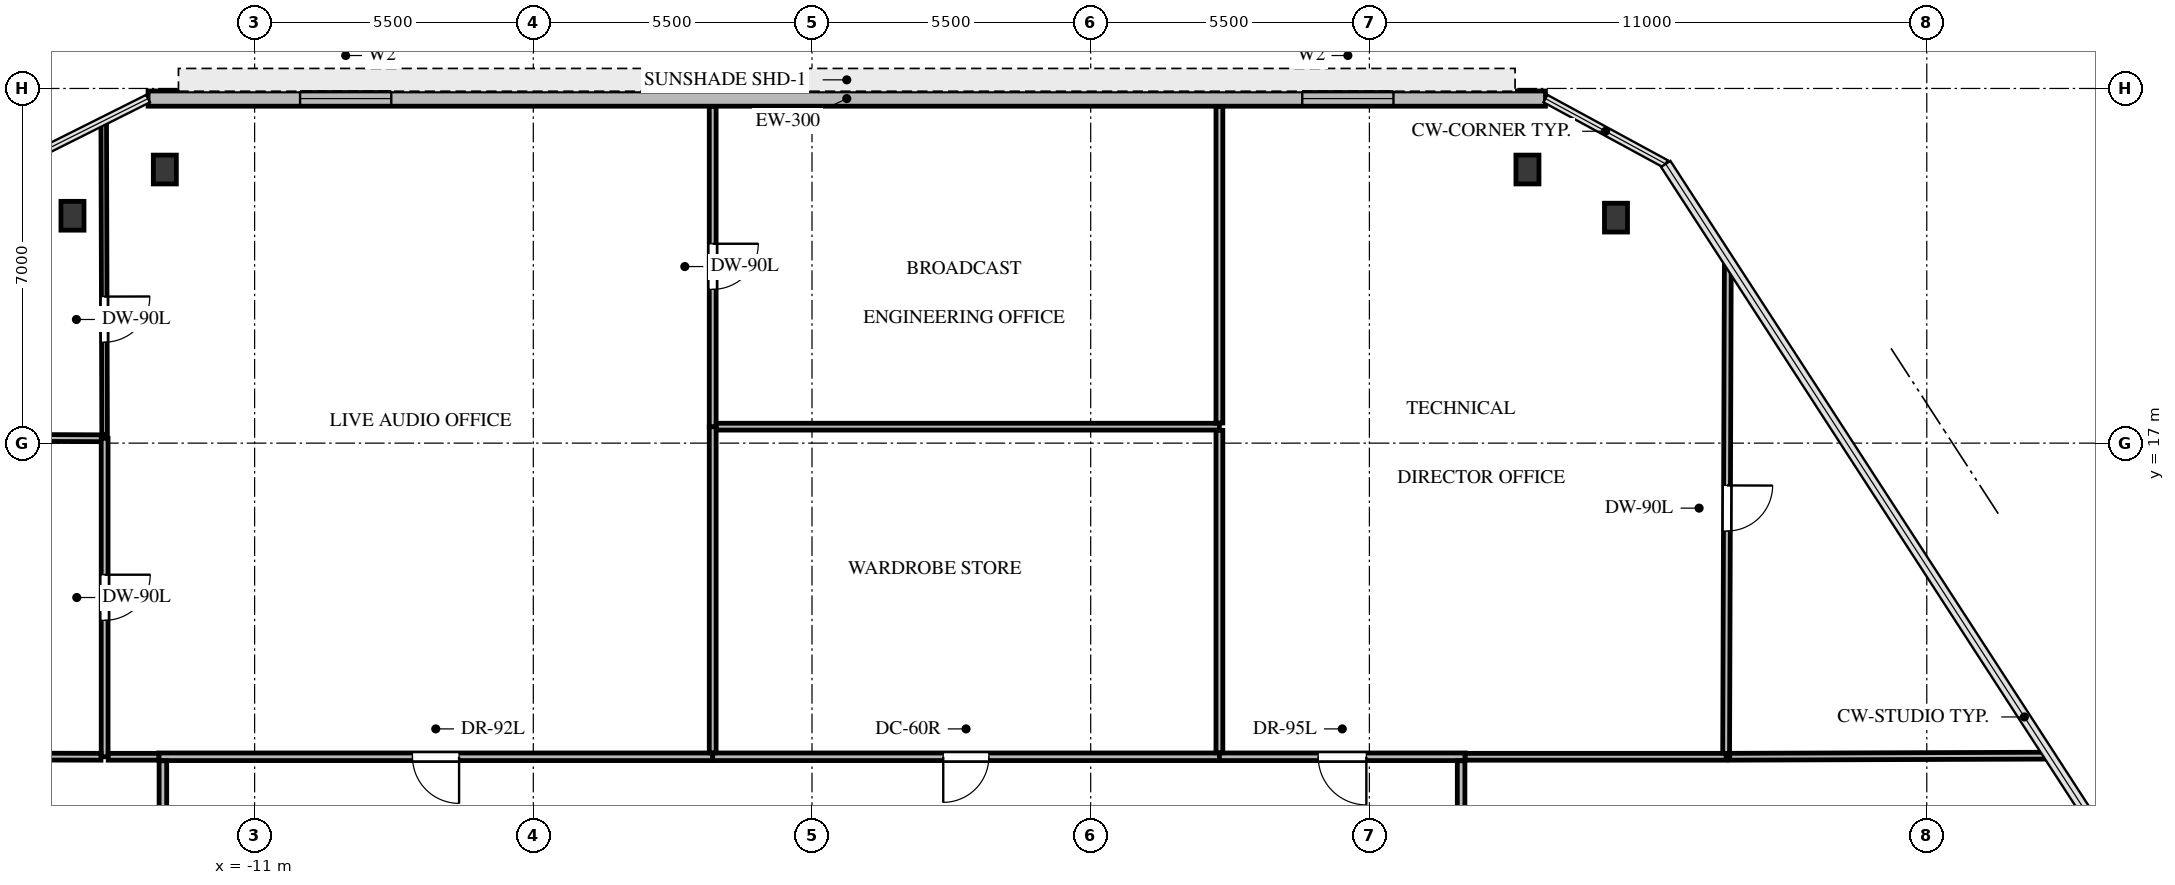
"""IFC4 building model, lengths in metres.
Left out: names, types, materials, properties, quantities, classifications, styles, units other than length and angle.
Written with IfcOpenShell. Run it as: python <this file> out.ifc"""

import sys

from ifc_helpers import new_model, si_unit, direction, frame, frame_2d, origin, origin_2d, place, context, subcontext, project, spatial, rectangle, i_section, extrude, source, transform, mapped, element, fill, save


model = new_model("IFC4")
c1 = context("Model", 3, precision=1e-05, world=origin(), true_north=direction((0.0, 1.0)))
c2 = subcontext(c1, "Body", "Model", "MODEL_VIEW")
j1 = project(units=[si_unit("LENGTHUNIT", "METRE"), si_unit("PLANEANGLEUNIT", "RADIAN")], contexts=[c1])
p1 = place(None, origin())
s1 = spatial("IfcSite", under=j1, at=p1, CompositionType="ELEMENT")
p2 = place(p1, origin())
s2 = spatial("IfcBuilding", under=s1, at=p2, CompositionType="ELEMENT")
p3 = place(p2, frame((0.0, 0.0, 21.2)))
s3 = spatial("IfcBuildingStorey", under=s2, at=p3, CompositionType="ELEMENT", Elevation=21.2)
m1 = source(origin(), c2, "Body", "SweptSolid", [
    extrude(i_section(OverallWidth=0.454, OverallDepth=0.569, WebThickness=0.078, FlangeThickness=0.125, FilletRadius=0.031, at=origin_2d()), origin(), (0.0, 0.0, 1.0), 5.6),
])
for number, where, z_axis, x_axis in (
    (1, (-14.594, 21.488, -0.32), (0.0, 0.0, 1.0), (1.0, 0.0, 0.0)),
    (2, (-12.772, 22.4, -0.32), (0.0, 0.0, 1.0), (1.0, 0.0, 0.0)),
    (3, (14.119, 22.4, -0.32), (0.0, 0.0, 1.0), (1.0, 0.0, 0.0)),
    (4, (15.866, 21.451, -0.32), (0.0, 0.0, 1.0), (1.0, 0.0, 0.0)),
):
    element("IfcColumn", number, at=place(p3, frame(where, z_axis=z_axis, x_axis=x_axis)), inside=s3, PredefinedType="COLUMN", context=c2, shape_type="MappedRepresentation", body=[
        mapped(m1, transform((0.0, 0.0, 0.0), x_axis=(1.0, 0.0, 0.0), y_axis=(0.0, 1.0, 0.0), z_axis=(0.0, 0.0, 1.0), scale=1.0)),
    ])
p4 = place(p3, frame((-13.103, 23.8, 0.0), z_axis=(0.0, 0.0, 1.0), x_axis=(1.0, 0.0, 0.0)))
e5 = element("IfcWall", 5, at=p4, inside=s3, PredefinedType="SOLIDWALL", context=c2, shape_type="SweptSolid", body=[
    extrude(rectangle(XDim=27.578, YDim=0.3, at=frame_2d((13.789, 0.0))), origin(), (0.0, 0.0, 1.0), 5.28),
])
p5 = place(p4, frame((3.0, 0.0, 1.0)))
e6 = element("IfcOpeningElement", 6, at=p5, cuts=e5, PredefinedType="OPENING", context=c2, shape_type="SweptSolid", body=[
    extrude(rectangle(XDim=1.8, YDim=2.1, at=frame_2d((0.9, 1.05))), frame((0.0, 0.16, 0.0), z_axis=(0.0, -1.0, 0.0), x_axis=(1.0, 0.0, 0.0)), (0.0, 0.0, 1.0), 0.32),
])
p6 = place(p4, frame((22.778, 0.0, 1.0)))
e7 = element("IfcOpeningElement", 7, at=p6, cuts=e5, PredefinedType="OPENING", context=c2, shape_type="SweptSolid", body=[
    extrude(rectangle(XDim=1.8, YDim=2.1, at=frame_2d((0.9, 1.05))), frame((0.0, 0.16, 0.0), z_axis=(0.0, -1.0, 0.0), x_axis=(1.0, 0.0, 0.0)), (0.0, 0.0, 1.0), 0.32),
])
p7 = place(p3, frame((-1.96, 10.81, 0.0), z_axis=(0.0, 0.0, 1.0), x_axis=(-1.0, 0.0, 0.0)))
e8 = element("IfcWall", 8, at=p7, inside=s3, PredefinedType="PARTITIONING", context=c2, shape_type="SweptSolid", body=[
    extrude(rectangle(XDim=10.93, YDim=0.15, at=frame_2d((5.465, 0.0))), origin(), (0.0, 0.0, 1.0), 4.285),
])
p8 = place(p7, frame((5.005, 0.0, 0.0)))
e9 = element("IfcOpeningElement", 9, at=p8, cuts=e8, PredefinedType="OPENING", context=c2, shape_type="SweptSolid", body=[
    extrude(rectangle(XDim=0.92, YDim=2.1, at=frame_2d((0.46, 1.05))), frame((0.0, 0.085, 0.0), z_axis=(0.0, -1.0, 0.0), x_axis=(1.0, 0.0, 0.0)), (0.0, 0.0, 1.0), 0.17),
])
p9 = place(p3, frame((8.04, 10.81, 0.0), z_axis=(0.0, 0.0, 1.0), x_axis=(-1.0, 0.0, 0.0)))
e10 = element("IfcWall", 10, at=p9, inside=s3, PredefinedType="PARTITIONING", context=c2, shape_type="SweptSolid", body=[
    extrude(rectangle(XDim=10.0, YDim=0.15, at=frame_2d((5.0, 0.0))), origin(), (0.0, 0.0, 1.0), 4.818),
])
p10 = place(p9, frame((4.55, 0.0, 0.0)))
e11 = element("IfcOpeningElement", 11, at=p10, cuts=e10, PredefinedType="OPENING", context=c2, shape_type="SweptSolid", body=[
    extrude(rectangle(XDim=0.9, YDim=2.05, at=frame_2d((0.45, 1.025))), frame((0.0, 0.085, 0.0), z_axis=(0.0, -1.0, 0.0), x_axis=(1.0, 0.0, 0.0)), (0.0, 0.0, 1.0), 0.17),
])
p11 = place(p3, frame((12.89, 10.81, 0.0), z_axis=(0.0, 0.0, 1.0), x_axis=(-1.0, 0.0, 0.0)))
e12 = element("IfcWall", 12, at=p11, inside=s3, PredefinedType="PARTITIONING", context=c2, shape_type="SweptSolid", body=[
    extrude(rectangle(XDim=4.85, YDim=0.15, at=frame_2d((2.425, 0.0))), origin(), (0.0, 0.0, 1.0), 4.285),
])
p12 = place(p11, frame((1.95, 0.0, 0.0)))
e13 = element("IfcOpeningElement", 13, at=p12, cuts=e12, PredefinedType="OPENING", context=c2, shape_type="SweptSolid", body=[
    extrude(rectangle(XDim=0.95, YDim=2.1, at=frame_2d((0.475, 1.05))), frame((0.0, 0.085, 0.0), z_axis=(0.0, -1.0, 0.0), x_axis=(1.0, 0.0, 0.0)), (0.0, 0.0, 1.0), 0.17),
])
p13 = place(p3, frame((-12.81, 10.731, 0.0), z_axis=(0.0, 0.0, 1.0), x_axis=(0.0, -1.0, 0.0)))
e14 = element("IfcWall", 14, at=p13, inside=s3, PredefinedType="PARTITIONING", context=c2, shape_type="SweptSolid", body=[
    extrude(rectangle(XDim=3.691, YDim=0.15, at=frame_2d((1.845, 0.0))), origin(), (0.0, 0.0, 1.0), 5.265),
])
p14 = place(p13, frame((1.371, 0.0, 0.0)))
e15 = element("IfcOpeningElement", 15, at=p14, cuts=e14, PredefinedType="OPENING", context=c2, shape_type="SweptSolid", body=[
    extrude(rectangle(XDim=0.95, YDim=2.1, at=frame_2d((0.475, 1.05))), frame((0.0, 0.085, 0.0), z_axis=(0.0, -1.0, 0.0), x_axis=(1.0, 0.0, 0.0)), (0.0, 0.0, 1.0), 0.17),
])
p15 = place(p3, frame((12.81, 4.54, 0.0), z_axis=(0.0, 0.0, 1.0), x_axis=(0.0, 1.0, 0.0)))
e16 = element("IfcWall", 16, at=p15, inside=s3, PredefinedType="PARTITIONING", context=c2, shape_type="SweptSolid", body=[
    extrude(rectangle(XDim=6.191, YDim=0.15, at=frame_2d((3.095, 0.0))), origin(), (0.0, 0.0, 1.0), 5.265),
])
p16 = place(p15, frame((0.35, 0.0, 0.0)))
e17 = element("IfcOpeningElement", 17, at=p16, cuts=e16, PredefinedType="OPENING", context=c2, shape_type="SweptSolid", body=[
    extrude(rectangle(XDim=0.95, YDim=2.1, at=frame_2d((0.475, 1.05))), frame((0.0, 0.085, 0.0), z_axis=(0.0, -1.0, 0.0), x_axis=(1.0, 0.0, 0.0)), (0.0, 0.0, 1.0), 0.17),
])
p17 = place(p3, frame((-19.612, 17.12, 0.0), z_axis=(0.0, 0.0, 1.0), x_axis=(0.999990855289, -0.004276603511, 0.0)))
e18 = element("IfcWall", 18, at=p17, inside=s3, PredefinedType="PARTITIONING", context=c2, shape_type="SweptSolid", body=[
    extrude(rectangle(XDim=5.652, YDim=0.135, at=frame_2d((2.826, 0.0))), origin(), (0.0, 0.0, 1.0), 4.574),
])
p18 = place(p3, frame((-13.96, 17.096, 0.0), z_axis=(0.0, 0.0, 1.0), x_axis=(0.0, -1.0, 0.0)))
e19 = element("IfcWall", 19, at=p18, inside=s3, PredefinedType="PARTITIONING", context=c2, shape_type="SweptSolid", body=[
    extrude(rectangle(XDim=6.286, YDim=0.135, at=frame_2d((3.143, 0.0))), origin(), (0.0, 0.0, 1.0), 5.265),
])
p19 = place(p18, frame((2.693, 0.0, 0.0)))
e20 = element("IfcOpeningElement", 20, at=p19, cuts=e19, PredefinedType="OPENING", context=c2, shape_type="SweptSolid", body=[
    extrude(rectangle(XDim=0.9, YDim=2.05, at=frame_2d((0.45, 1.025))), frame((0.0, 0.078, 0.0), z_axis=(0.0, -1.0, 0.0), x_axis=(1.0, 0.0, 0.0)), (0.0, 0.0, 1.0), 0.155),
])
p20 = place(p3, frame((-14.031, 10.81, 0.0), z_axis=(0.0, 0.0, 1.0), x_axis=(-0.999997348739, 0.002302719182, 0.0)))
e21 = element("IfcWall", 21, at=p20, inside=s3, PredefinedType="PARTITIONING", context=c2, shape_type="SweptSolid", body=[
    extrude(rectangle(XDim=10.284, YDim=0.135, at=frame_2d((5.142, 0.0))), origin(), (0.0, 0.0, 1.0), 4.574),
])
p21 = place(p3, frame((-13.978, 23.362, 0.0), z_axis=(0.0, 0.0, 1.0), x_axis=(0.002798349441, -0.999996084613, 0.0)))
e22 = element("IfcWall", 22, at=p21, inside=s3, PredefinedType="MOVABLE", context=c2, shape_type="SweptSolid", body=[
    extrude(rectangle(XDim=6.194, YDim=0.11, at=frame_2d((3.097, 0.0))), origin(), (0.0, 0.0, 1.0), 4.285),
])
p22 = place(p21, frame((3.47, 0.0, 0.0)))
e23 = element("IfcOpeningElement", 23, at=p22, cuts=e22, PredefinedType="OPENING", context=c2, shape_type="SweptSolid", body=[
    extrude(rectangle(XDim=0.9, YDim=2.05, at=frame_2d((0.45, 1.025))), frame((0.0, 0.065, 0.0), z_axis=(0.0, -1.0, 0.0), x_axis=(1.0, 0.0, 0.0)), (0.0, 0.0, 1.0), 0.13),
])
p23 = place(p3, frame((-1.96, 17.325, 0.0), z_axis=(0.0, 0.0, 1.0), x_axis=(0.0, -1.0, 0.0)))
e24 = element("IfcWall", 24, at=p23, inside=s3, PredefinedType="PARTITIONING", context=c2, shape_type="SweptSolid", body=[
    extrude(rectangle(XDim=6.436, YDim=0.135, at=frame_2d((3.218, 0.0))), origin(), (0.0, 0.0, 1.0), 5.265),
])
p24 = place(p3, frame((-1.96, 23.645, 0.0), z_axis=(0.0, 0.0, 1.0), x_axis=(0.0, -1.0, 0.0)))
e25 = element("IfcWall", 25, at=p24, inside=s3, PredefinedType="PARTITIONING", context=c2, shape_type="SweptSolid", body=[
    extrude(rectangle(XDim=6.32, YDim=0.135, at=frame_2d((3.16, 0.0))), origin(), (0.0, 0.0, 1.0), 4.574),
])
p25 = place(p24, frame((2.71, 0.0, 0.0)))
e26 = element("IfcOpeningElement", 26, at=p25, cuts=e25, PredefinedType="OPENING", context=c2, shape_type="SweptSolid", body=[
    extrude(rectangle(XDim=0.9, YDim=2.05, at=frame_2d((0.45, 1.025))), frame((0.0, 0.078, 0.0), z_axis=(0.0, -1.0, 0.0), x_axis=(1.0, 0.0, 0.0)), (0.0, 0.0, 1.0), 0.155),
])
p26 = place(p3, frame((-12.89, 10.81, 0.0), z_axis=(0.0, 0.0, 1.0), x_axis=(-1.0, 0.0, 0.0)))
e27 = element("IfcWall", 27, at=p26, inside=s3, PredefinedType="PARTITIONING", context=c2, shape_type="SweptSolid", body=[
    extrude(rectangle(XDim=0.999, YDim=0.135, at=frame_2d((0.499, 0.0))), origin(), (0.0, 0.0, 1.0), 5.265),
])
p27 = place(p3, frame((-1.888, 17.325, 0.0), z_axis=(0.0, 0.0, 1.0), x_axis=(1.0, 0.0, 0.0)))
e28 = element("IfcWall", 28, at=p27, inside=s3, PredefinedType="PARTITIONING", context=c2, shape_type="SweptSolid", body=[
    extrude(rectangle(XDim=9.928, YDim=0.135, at=frame_2d((4.964, 0.0))), origin(), (0.0, 0.0, 1.0), 4.818),
])
p28 = place(p3, frame((8.04, 17.253, 0.0), z_axis=(0.0, 0.0, 1.0), x_axis=(0.0, -1.0, 0.0)))
e29 = element("IfcWall", 29, at=p28, inside=s3, PredefinedType="PARTITIONING", context=c2, shape_type="SweptSolid", body=[
    extrude(rectangle(XDim=6.365, YDim=0.135, at=frame_2d((3.182, 0.0))), origin(), (0.0, 0.0, 1.0), 5.265),
])
p29 = place(p3, frame((8.04, 23.645, 0.0), z_axis=(0.0, 0.0, 1.0), x_axis=(0.0, -1.0, 0.0)))
e30 = element("IfcWall", 30, at=p29, inside=s3, PredefinedType="PARTITIONING", context=c2, shape_type="SweptSolid", body=[
    extrude(rectangle(XDim=6.249, YDim=0.135, at=frame_2d((3.124, 0.0))), origin(), (0.0, 0.0, 1.0), 4.574),
])
p30 = place(p3, frame((18.073, 20.62, 0.0), z_axis=(0.0, 0.0, 1.0), x_axis=(-0.003409382171, -0.99999418804, 0.0)))
e31 = element("IfcWall", 31, at=p30, inside=s3, PredefinedType="PARTITIONING", context=c2, shape_type="SweptSolid", body=[
    extrude(rectangle(XDim=9.81, YDim=0.135, at=frame_2d((4.905, 0.0))), origin(), (0.0, 0.0, 1.0), 4.574),
])
p31 = place(p30, frame((4.455, 0.0, 0.0)))
e32 = element("IfcOpeningElement", 32, at=p31, cuts=e31, PredefinedType="OPENING", context=c2, shape_type="SweptSolid", body=[
    extrude(rectangle(XDim=0.9, YDim=2.05, at=frame_2d((0.45, 1.025))), frame((0.0, 0.078, 0.0), z_axis=(0.0, -1.0, 0.0), x_axis=(1.0, 0.0, 0.0)), (0.0, 0.0, 1.0), 0.155),
])
p32 = place(p3, frame((18.04, 10.81, 0.0), z_axis=(0.0, 0.0, 1.0), x_axis=(-1.0, 0.0, 0.0)))
e33 = element("IfcWall", 33, at=p32, inside=s3, PredefinedType="PARTITIONING", context=c2, shape_type="SweptSolid", body=[
    extrude(rectangle(XDim=5.15, YDim=0.135, at=frame_2d((2.575, 0.0))), origin(), (0.0, 0.0, 1.0), 5.265),
])
p33 = place(p3, frame((24.422, 10.832, 0.0), z_axis=(0.0, 0.0, 1.0), x_axis=(-0.999994334762, -0.003366072395, 0.0)))
e34 = element("IfcWall", 34, at=p33, inside=s3, PredefinedType="PARTITIONING", context=c2, shape_type="SweptSolid", body=[
    extrude(rectangle(XDim=6.31, YDim=0.135, at=frame_2d((3.155, 0.0))), origin(), (0.0, 0.0, 1.0), 4.574),
])
m2 = source(origin(), c2, "Body", "SweptSolid", [
    extrude(rectangle(XDim=1.8, YDim=2.1, at=frame_2d((0.9, 1.05))), frame((0.0, 0.03, 0.0), z_axis=(0.0, -1.0, 0.0), x_axis=(1.0, 0.0, 0.0)), (0.0, 0.0, 1.0), 0.06),
])
p34 = place(p5, origin())
e35 = element("IfcWindow", 35, at=p34, inside=s3, PartitioningType="DOUBLE_PANEL_VERTICAL", PredefinedType="WINDOW", context=c2, shape_type="MappedRepresentation", body=[
    mapped(m2, transform((0.0, 0.0, 0.0), x_axis=(1.0, 0.0, 0.0), y_axis=(0.0, 1.0, 0.0), z_axis=(0.0, 0.0, 1.0), scale=1.0)),
])
fill(e6, e35)
p35 = place(p6, origin())
e36 = element("IfcWindow", 36, at=p35, inside=s3, PartitioningType="DOUBLE_PANEL_VERTICAL", PredefinedType="WINDOW", context=c2, shape_type="MappedRepresentation", body=[
    mapped(m2, transform((0.0, 0.0, 0.0), x_axis=(1.0, 0.0, 0.0), y_axis=(0.0, 1.0, 0.0), z_axis=(0.0, 0.0, 1.0), scale=1.0)),
])
fill(e7, e36)
m3 = source(origin(), c2, "Body", "SweptSolid", [
    extrude(rectangle(XDim=0.92, YDim=2.1, at=frame_2d((0.46, 1.05))), frame((0.0, 0.025, 0.0), z_axis=(0.0, -1.0, 0.0), x_axis=(1.0, 0.0, 0.0)), (0.0, 0.0, 1.0), 0.05),
])
p36 = place(p8, origin())
e37 = element("IfcDoor", 37, at=p36, inside=s3, OperationType="SINGLE_SWING_LEFT", PredefinedType="DOOR", context=c2, shape_type="MappedRepresentation", body=[
    mapped(m3, transform((0.0, 0.0, 0.0), x_axis=(1.0, 0.0, 0.0), y_axis=(0.0, 1.0, 0.0), z_axis=(0.0, 0.0, 1.0), scale=1.0)),
])
fill(e9, e37)
m4 = source(origin(), c2, "Body", "SweptSolid", [
    extrude(rectangle(XDim=0.9, YDim=2.05, at=frame_2d((0.45, 1.025))), frame((0.0, 0.025, 0.0), z_axis=(0.0, -1.0, 0.0), x_axis=(1.0, 0.0, 0.0)), (0.0, 0.0, 1.0), 0.05),
])
p37 = place(p10, origin())
e38 = element("IfcDoor", 38, at=p37, inside=s3, OperationType="SINGLE_SWING_RIGHT", PredefinedType="DOOR", context=c2, shape_type="MappedRepresentation", body=[
    mapped(m4, transform((0.0, 0.0, 0.0), x_axis=(1.0, 0.0, 0.0), y_axis=(0.0, 1.0, 0.0), z_axis=(0.0, 0.0, 1.0), scale=1.0)),
])
fill(e11, e38)
m5 = source(origin(), c2, "Body", "SweptSolid", [
    extrude(rectangle(XDim=0.95, YDim=2.1, at=frame_2d((0.475, 1.05))), frame((0.0, 0.025, 0.0), z_axis=(0.0, -1.0, 0.0), x_axis=(1.0, 0.0, 0.0)), (0.0, 0.0, 1.0), 0.05),
])
p38 = place(p12, origin())
e39 = element("IfcDoor", 39, at=p38, inside=s3, OperationType="SINGLE_SWING_LEFT", PredefinedType="DOOR", context=c2, shape_type="MappedRepresentation", body=[
    mapped(m5, transform((0.0, 0.0, 0.0), x_axis=(1.0, 0.0, 0.0), y_axis=(0.0, 1.0, 0.0), z_axis=(0.0, 0.0, 1.0), scale=1.0)),
])
fill(e13, e39)
m6 = source(origin(), c2, "Body", "SweptSolid", [
    extrude(rectangle(XDim=0.9, YDim=2.05, at=frame_2d((0.45, 1.025))), frame((0.0, 0.025, 0.0), z_axis=(0.0, -1.0, 0.0), x_axis=(1.0, 0.0, 0.0)), (0.0, 0.0, 1.0), 0.05),
])
p39 = place(p19, origin())
e40 = element("IfcDoor", 40, at=p39, inside=s3, OperationType="SINGLE_SWING_LEFT", PredefinedType="DOOR", context=c2, shape_type="MappedRepresentation", body=[
    mapped(m6, transform((0.0, 0.0, 0.0), x_axis=(1.0, 0.0, 0.0), y_axis=(0.0, 1.0, 0.0), z_axis=(0.0, 0.0, 1.0), scale=1.0)),
])
fill(e20, e40)
p40 = place(p22, origin())
e41 = element("IfcDoor", 41, at=p40, inside=s3, OperationType="SINGLE_SWING_LEFT", PredefinedType="DOOR", context=c2, shape_type="MappedRepresentation", body=[
    mapped(m6, transform((0.0, 0.0, 0.0), x_axis=(1.0, 0.0, 0.0), y_axis=(0.0, 1.0, 0.0), z_axis=(0.0, 0.0, 1.0), scale=1.0)),
])
fill(e23, e41)
p41 = place(p25, origin())
e42 = element("IfcDoor", 42, at=p41, inside=s3, OperationType="SINGLE_SWING_LEFT", PredefinedType="DOOR", context=c2, shape_type="MappedRepresentation", body=[
    mapped(m6, transform((0.0, 0.0, 0.0), x_axis=(1.0, 0.0, 0.0), y_axis=(0.0, 1.0, 0.0), z_axis=(0.0, 0.0, 1.0), scale=1.0)),
])
fill(e26, e42)
p42 = place(p31, origin())
e43 = element("IfcDoor", 43, at=p42, inside=s3, OperationType="SINGLE_SWING_LEFT", PredefinedType="DOOR", context=c2, shape_type="MappedRepresentation", body=[
    mapped(m6, transform((0.0, 0.0, 0.0), x_axis=(1.0, 0.0, 0.0), y_axis=(0.0, 1.0, 0.0), z_axis=(0.0, 0.0, 1.0), scale=1.0)),
])
fill(e32, e43)
save(model, sys.argv[1])
